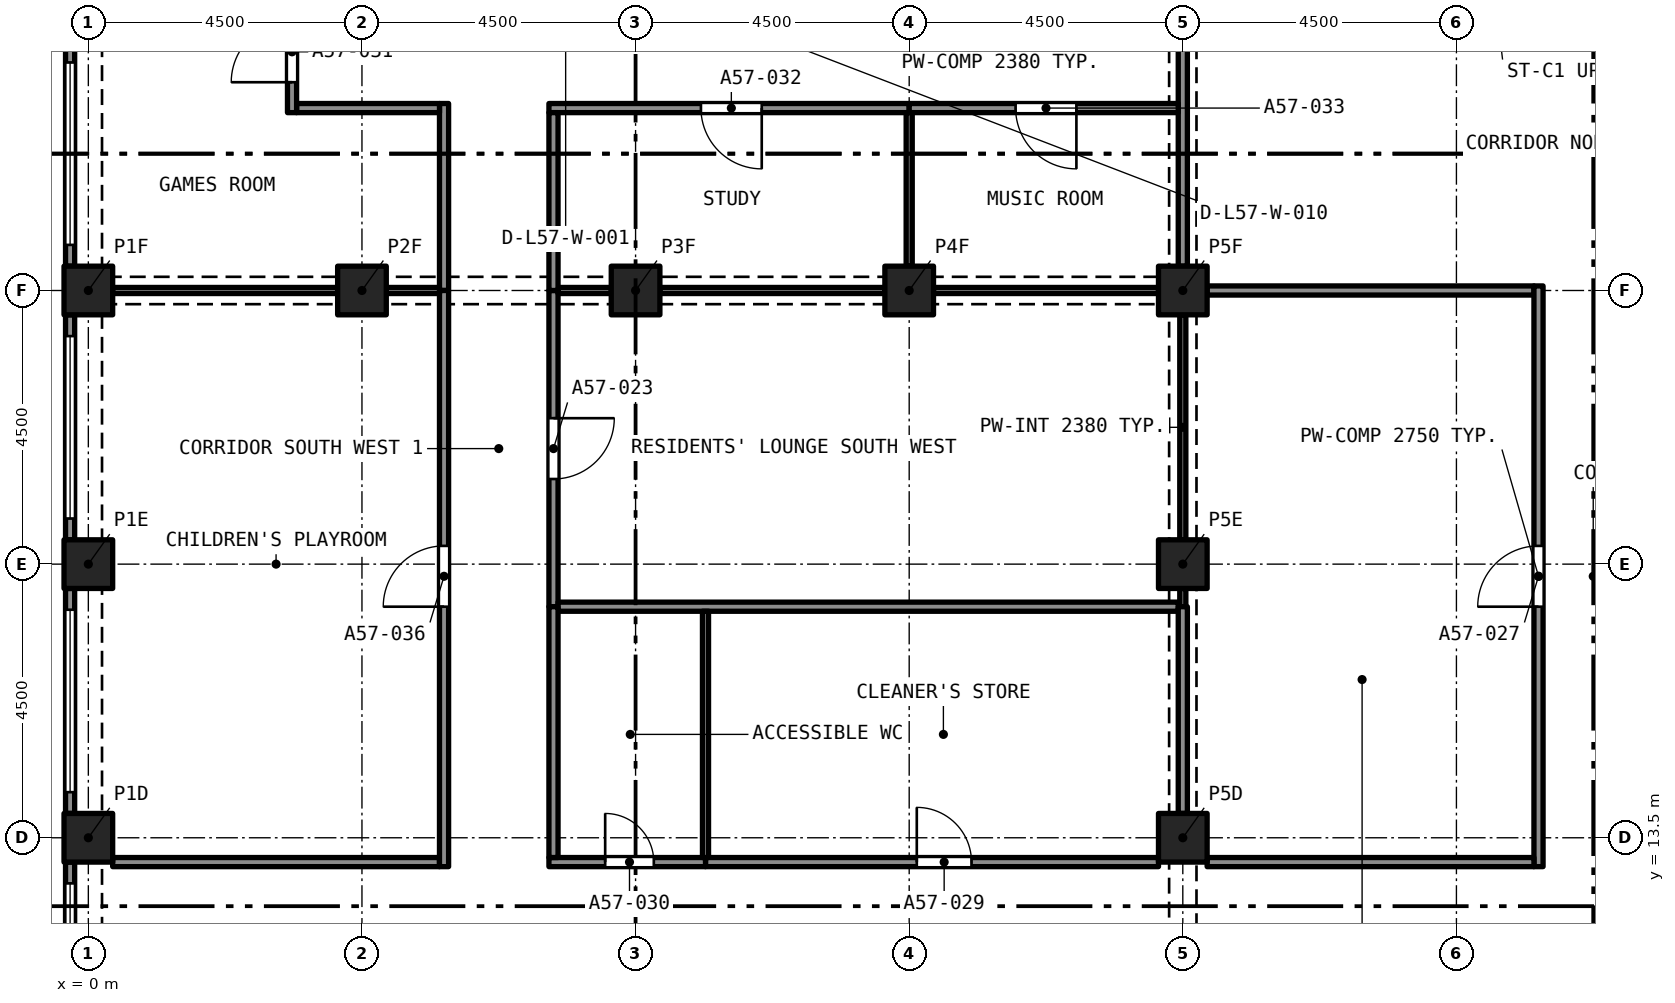
"""IFC4 building model, lengths in metres.
Left out: names, types, materials, properties, quantities, classifications, styles, units other than length and angle.
Written with IfcOpenShell. Run it as: python <this file> out.ifc"""

import sys

from ifc_helpers import new_model, si_unit, direction, frame, frame_2d, origin, origin_2d, place, context, subcontext, project, spatial, rectangle, extrude, element, fill, save


model = new_model("IFC4")
c1 = context("Model", 3, precision=1e-05, world=origin(), true_north=direction((0.0, 1.0)))
c2 = subcontext(c1, "Body", "Model", "MODEL_VIEW")
j1 = project(units=[si_unit("LENGTHUNIT", "METRE"), si_unit("PLANEANGLEUNIT", "RADIAN")], contexts=[c1])
p1 = place(None, origin())
s1 = spatial("IfcSite", under=j1, at=p1, CompositionType="ELEMENT")
p2 = place(p1, origin())
s2 = spatial("IfcBuilding", under=s1, at=p2, CompositionType="ELEMENT")
p3 = place(p2, frame((0.0, 0.0, 206.895)))
s3 = spatial("IfcBuildingStorey", under=s2, at=p3, CompositionType="ELEMENT", Elevation=206.895)
for number, where, z_axis, x_axis in (
    (1, (0.0, 13.5, 0.0), (0.0, 0.0, 1.0), (1.0, 0.0, 0.0)),
    (2, (18.0, 13.5, 0.0), (0.0, 0.0, 1.0), (1.0, 0.0, 0.0)),
    (3, (0.0, 18.0, 0.0), (0.0, 0.0, 1.0), (1.0, 0.0, 0.0)),
    (4, (18.0, 18.0, 0.0), (0.0, 0.0, 1.0), (1.0, 0.0, 0.0)),
    (5, (0.0, 22.5, 0.0), (0.0, 0.0, 1.0), (1.0, 0.0, 0.0)),
    (6, (4.5, 22.5, 0.0), (0.0, 0.0, 1.0), (1.0, 0.0, 0.0)),
    (7, (9.0, 22.5, 0.0), (0.0, 0.0, 1.0), (1.0, 0.0, 0.0)),
    (8, (13.5, 22.5, 0.0), (0.0, 0.0, 1.0), (1.0, 0.0, 0.0)),
    (9, (18.0, 22.5, 0.0), (0.0, 0.0, 1.0), (1.0, 0.0, 0.0)),
):
    element("IfcColumn", number, at=place(p3, frame(where, z_axis=z_axis, x_axis=x_axis)), inside=s3, PredefinedType="COLUMN", context=c2, shape_type="SweptSolid", body=[
        extrude(rectangle(XDim=0.8, YDim=0.8, at=origin_2d()), origin(), (0.0, 0.0, 1.0), 3.2),
    ])
p4 = place(p3, frame((-0.3, 22.9, 0.0), z_axis=(0.0, 0.0, 1.0), x_axis=(0.0, 1.0, 0.0)))
e10 = element("IfcWall", 10, at=p4, inside=s3, PredefinedType="SOLIDWALL", context=c2, shape_type="SweptSolid", body=[
    extrude(rectangle(XDim=3.7, YDim=0.15, at=frame_2d((1.85, 0.0))), origin(), (0.0, 0.0, 1.0), 3.2),
])
p5 = place(p4, frame((0.35, 0.0, 0.45)))
e11 = element("IfcOpeningElement", 11, at=p5, cuts=e10, PredefinedType="OPENING", context=c2, shape_type="SweptSolid", body=[
    extrude(rectangle(XDim=3.0, YDim=1.95, at=frame_2d((1.5, 0.975))), frame((0.0, 0.085, 0.0), z_axis=(0.0, -1.0, 0.0), x_axis=(1.0, 0.0, 0.0)), (0.0, 0.0, 1.0), 0.17),
])
p6 = place(p3, frame((-0.3, 18.4, 0.0), z_axis=(0.0, 0.0, 1.0), x_axis=(0.0, 1.0, 0.0)))
e12 = element("IfcWall", 12, at=p6, inside=s3, PredefinedType="SOLIDWALL", context=c2, shape_type="SweptSolid", body=[
    extrude(rectangle(XDim=3.7, YDim=0.15, at=frame_2d((1.85, 0.0))), origin(), (0.0, 0.0, 1.0), 3.2),
])
p7 = place(p6, frame((0.35, 0.0, 0.45)))
e13 = element("IfcOpeningElement", 13, at=p7, cuts=e12, PredefinedType="OPENING", context=c2, shape_type="SweptSolid", body=[
    extrude(rectangle(XDim=3.0, YDim=1.95, at=frame_2d((1.5, 0.975))), frame((0.0, 0.085, 0.0), z_axis=(0.0, -1.0, 0.0), x_axis=(1.0, 0.0, 0.0)), (0.0, 0.0, 1.0), 0.17),
])
p8 = place(p3, frame((-0.3, 13.9, 0.0), z_axis=(0.0, 0.0, 1.0), x_axis=(0.0, 1.0, 0.0)))
e14 = element("IfcWall", 14, at=p8, inside=s3, PredefinedType="SOLIDWALL", context=c2, shape_type="SweptSolid", body=[
    extrude(rectangle(XDim=3.7, YDim=0.15, at=frame_2d((1.85, 0.0))), origin(), (0.0, 0.0, 1.0), 3.2),
])
p9 = place(p8, frame((0.35, 0.0, 0.45)))
e15 = element("IfcOpeningElement", 15, at=p9, cuts=e14, PredefinedType="OPENING", context=c2, shape_type="SweptSolid", body=[
    extrude(rectangle(XDim=3.0, YDim=1.95, at=frame_2d((1.5, 0.975))), frame((0.0, 0.085, 0.0), z_axis=(0.0, -1.0, 0.0), x_axis=(1.0, 0.0, 0.0)), (0.0, 0.0, 1.0), 0.17),
])
p10 = place(p3, frame((-0.3, 9.4, 0.0), z_axis=(0.0, 0.0, 1.0), x_axis=(0.0, 1.0, 0.0)))
e16 = element("IfcWall", 16, at=p10, inside=s3, PredefinedType="SOLIDWALL", context=c2, shape_type="SweptSolid", body=[
    extrude(rectangle(XDim=3.7, YDim=0.15, at=frame_2d((1.85, 0.0))), origin(), (0.0, 0.0, 1.0), 3.2),
])
p11 = place(p10, frame((0.35, 0.0, 0.45)))
e17 = element("IfcOpeningElement", 17, at=p11, cuts=e16, PredefinedType="OPENING", context=c2, shape_type="SweptSolid", body=[
    extrude(rectangle(XDim=3.0, YDim=1.95, at=frame_2d((1.5, 0.975))), frame((0.0, 0.085, 0.0), z_axis=(0.0, -1.0, 0.0), x_axis=(1.0, 0.0, 0.0)), (0.0, 0.0, 1.0), 0.17),
])
p12 = place(p3, frame((18.0, 18.4, 0.0), z_axis=(0.0, 0.0, 1.0), x_axis=(0.0, 1.0, 0.0)))
e18 = element("IfcWall", 18, at=p12, inside=s3, PredefinedType="PARTITIONING", context=c2, shape_type="SweptSolid", body=[
    extrude(rectangle(XDim=3.7, YDim=0.1, at=frame_2d((1.85, 0.0))), origin(), (0.0, 0.0, 1.0), 2.38),
])
p13 = place(p3, frame((18.0, 17.3, 0.0), z_axis=(0.0, 0.0, 1.0), x_axis=(0.0, 1.0, 0.0)))
e19 = element("IfcWall", 19, at=p13, inside=s3, PredefinedType="PARTITIONING", context=c2, shape_type="SweptSolid", body=[
    extrude(rectangle(XDim=0.3, YDim=0.1, at=frame_2d((0.15, 0.0))), origin(), (0.0, 0.0, 1.0), 2.75),
])
p14 = place(p3, frame((7.65, 22.5, 0.0), z_axis=(0.0, 0.0, 1.0), x_axis=(0.0, -1.0, 0.0)))
e20 = element("IfcWall", 20, at=p14, inside=s3, PredefinedType="PARTITIONING", context=c2, shape_type="SweptSolid", body=[
    extrude(rectangle(XDim=5.2, YDim=0.15, at=frame_2d((2.6, 0.0))), origin(), (0.0, 0.0, 1.0), 2.9),
])
p15 = place(p14, frame((2.1, 0.0, 0.0)))
e21 = element("IfcOpeningElement", 21, at=p15, cuts=e20, PredefinedType="OPENING", context=c2, shape_type="SweptSolid", body=[
    extrude(rectangle(XDim=1.0, YDim=2.1, at=frame_2d((0.5, 1.05))), frame((0.0, 0.085, 0.0), z_axis=(0.0, -1.0, 0.0), x_axis=(1.0, 0.0, 0.0)), (0.0, 0.0, 1.0), 0.17),
])
p16 = place(p3, frame((7.725, 22.5, 0.0), z_axis=(0.0, 0.0, 1.0), x_axis=(1.0, 0.0, 0.0)))
e22 = element("IfcWall", 22, at=p16, inside=s3, PredefinedType="PARTITIONING", context=c2, shape_type="SweptSolid", body=[
    extrude(rectangle(XDim=0.875, YDim=0.1, at=frame_2d((0.438, 0.0))), origin(), (0.0, 0.0, 1.0), 2.38),
])
for number, where, z_axis, x_axis in (
    (23, (9.4, 22.5, 0.0), (0.0, 0.0, 1.0), (1.0, 0.0, 0.0)),
    (24, (13.9, 22.5, 0.0), (0.0, 0.0, 1.0), (1.0, 0.0, 0.0)),
):
    element("IfcWall", number, at=place(p3, frame(where, z_axis=z_axis, x_axis=x_axis)), inside=s3, PredefinedType="PARTITIONING", context=c2, shape_type="SweptSolid", body=[
        extrude(rectangle(XDim=3.7, YDim=0.1, at=frame_2d((1.85, 0.0))), origin(), (0.0, 0.0, 1.0), 2.38),
    ])
p17 = place(p3, frame((7.725, 17.3, 0.0), z_axis=(0.0, 0.0, 1.0), x_axis=(1.0, 0.0, 0.0)))
e25 = element("IfcWall", 25, at=p17, inside=s3, PredefinedType="PARTITIONING", context=c2, shape_type="SweptSolid", body=[
    extrude(rectangle(XDim=10.2, YDim=0.15, at=frame_2d((5.1, 0.0))), origin(), (0.0, 0.0, 1.0), 2.9),
])
p18 = place(p3, frame((18.4, 22.5, 0.0), z_axis=(0.0, 0.0, 1.0), x_axis=(1.0, 0.0, 0.0)))
e26 = element("IfcWall", 26, at=p18, inside=s3, PredefinedType="PARTITIONING", context=c2, shape_type="SweptSolid", body=[
    extrude(rectangle(XDim=5.375, YDim=0.15, at=frame_2d((2.688, 0.0))), origin(), (0.0, 0.0, 1.0), 2.75),
])
p19 = place(p3, frame((18.0, 22.9, 0.0), z_axis=(0.0, 0.0, 1.0), x_axis=(0.0, 1.0, 0.0)))
e27 = element("IfcWall", 27, at=p19, inside=s3, PredefinedType="PARTITIONING", context=c2, shape_type="SweptSolid", body=[
    extrude(rectangle(XDim=3.7, YDim=0.15, at=frame_2d((1.85, 0.0))), origin(), (0.0, 0.0, 1.0), 2.38),
])
p20 = place(p3, frame((23.85, 13.025, 0.0), z_axis=(0.0, 0.0, 1.0), x_axis=(0.0, 1.0, 0.0)))
e28 = element("IfcWall", 28, at=p20, inside=s3, PredefinedType="PARTITIONING", context=c2, shape_type="SweptSolid", body=[
    extrude(rectangle(XDim=9.55, YDim=0.15, at=frame_2d((4.775, 0.0))), origin(), (0.0, 0.0, 1.0), 2.75),
])
p21 = place(p20, frame((4.275, 0.0, 0.0)))
e29 = element("IfcOpeningElement", 29, at=p21, cuts=e28, PredefinedType="OPENING", context=c2, shape_type="SweptSolid", body=[
    extrude(rectangle(XDim=1.0, YDim=2.1, at=frame_2d((0.5, 1.05))), frame((0.0, 0.085, 0.0), z_axis=(0.0, -1.0, 0.0), x_axis=(1.0, 0.0, 0.0)), (0.0, 0.0, 1.0), 0.17),
])
p22 = place(p3, frame((18.4, 13.1, 0.0), z_axis=(0.0, 0.0, 1.0), x_axis=(1.0, 0.0, 0.0)))
e30 = element("IfcWall", 30, at=p22, inside=s3, PredefinedType="PARTITIONING", context=c2, shape_type="SweptSolid", body=[
    extrude(rectangle(XDim=5.375, YDim=0.15, at=frame_2d((2.688, 0.0))), origin(), (0.0, 0.0, 1.0), 2.75),
])
p23 = place(p3, frame((10.15, 13.1, 0.0), z_axis=(0.0, 0.0, 1.0), x_axis=(1.0, 0.0, 0.0)))
e31 = element("IfcWall", 31, at=p23, inside=s3, PredefinedType="PARTITIONING", context=c2, shape_type="SweptSolid", body=[
    extrude(rectangle(XDim=7.45, YDim=0.15, at=frame_2d((3.725, 0.0))), origin(), (0.0, 0.0, 1.0), 2.9),
])
p24 = place(p23, frame((3.475, 0.0, 0.0)))
e32 = element("IfcOpeningElement", 32, at=p24, cuts=e31, PredefinedType="OPENING", context=c2, shape_type="SweptSolid", body=[
    extrude(rectangle(XDim=0.9, YDim=2.1, at=frame_2d((0.45, 1.05))), frame((0.0, 0.085, 0.0), z_axis=(0.0, -1.0, 0.0), x_axis=(1.0, 0.0, 0.0)), (0.0, 0.0, 1.0), 0.17),
])
p25 = place(p3, frame((7.575, 13.1, 0.0), z_axis=(0.0, 0.0, 1.0), x_axis=(1.0, 0.0, 0.0)))
e33 = element("IfcWall", 33, at=p25, inside=s3, PredefinedType="PARTITIONING", context=c2, shape_type="SweptSolid", body=[
    extrude(rectangle(XDim=2.575, YDim=0.15, at=frame_2d((1.288, 0.0))), origin(), (0.0, 0.0, 1.0), 2.9),
])
p26 = place(p25, frame((0.925, 0.0, 0.0)))
e34 = element("IfcOpeningElement", 34, at=p26, cuts=e33, PredefinedType="OPENING", context=c2, shape_type="SweptSolid", body=[
    extrude(rectangle(XDim=0.8, YDim=2.1, at=frame_2d((0.4, 1.05))), frame((0.0, 0.085, 0.0), z_axis=(0.0, -1.0, 0.0), x_axis=(1.0, 0.0, 0.0)), (0.0, 0.0, 1.0), 0.17),
])
p27 = place(p3, frame((0.4, 13.1, 0.0), z_axis=(0.0, 0.0, 1.0), x_axis=(1.0, 0.0, 0.0)))
e35 = element("IfcWall", 35, at=p27, inside=s3, PredefinedType="PARTITIONING", context=c2, shape_type="SweptSolid", body=[
    extrude(rectangle(XDim=5.375, YDim=0.15, at=frame_2d((2.688, 0.0))), origin(), (0.0, 0.0, 1.0), 2.9),
])
p28 = place(p3, frame((18.0, 13.9, 0.0), z_axis=(0.0, 0.0, 1.0), x_axis=(0.0, 1.0, 0.0)))
e36 = element("IfcWall", 36, at=p28, inside=s3, PredefinedType="PARTITIONING", context=c2, shape_type="SweptSolid", body=[
    extrude(rectangle(XDim=3.4, YDim=0.15, at=frame_2d((1.7, 0.0))), origin(), (0.0, 0.0, 1.0), 2.38),
])
p29 = place(p3, frame((5.85, 22.5, 0.0), z_axis=(0.0, 0.0, 1.0), x_axis=(0.0, 1.0, 0.0)))
e37 = element("IfcWall", 37, at=p29, inside=s3, PredefinedType="PARTITIONING", context=c2, shape_type="SweptSolid", body=[
    extrude(rectangle(XDim=3.075, YDim=0.15, at=frame_2d((1.538, 0.0))), origin(), (0.0, 0.0, 1.0), 2.9),
])
p30 = place(p3, frame((3.425, 25.5, 0.0), z_axis=(0.0, 0.0, 1.0), x_axis=(1.0, 0.0, 0.0)))
e38 = element("IfcWall", 38, at=p30, inside=s3, PredefinedType="PARTITIONING", context=c2, shape_type="SweptSolid", body=[
    extrude(rectangle(XDim=2.35, YDim=0.15, at=frame_2d((1.175, 0.0))), origin(), (0.0, 0.0, 1.0), 2.9),
])
p31 = place(p3, frame((3.35, 25.425, 0.0), z_axis=(0.0, 0.0, 1.0), x_axis=(0.0, 1.0, 0.0)))
e39 = element("IfcWall", 39, at=p31, inside=s3, PredefinedType="PARTITIONING", context=c2, shape_type="SweptSolid", body=[
    extrude(rectangle(XDim=1.925, YDim=0.15, at=frame_2d((0.962, 0.0))), origin(), (0.0, 0.0, 1.0), 2.9),
])
p32 = place(p31, frame((0.5, 0.0, 0.0)))
e40 = element("IfcOpeningElement", 40, at=p32, cuts=e39, PredefinedType="OPENING", context=c2, shape_type="SweptSolid", body=[
    extrude(rectangle(XDim=1.0, YDim=2.1, at=frame_2d((0.5, 1.05))), frame((0.0, 0.085, 0.0), z_axis=(0.0, -1.0, 0.0), x_axis=(1.0, 0.0, 0.0)), (0.0, 0.0, 1.0), 0.17),
])
p33 = place(p3, frame((13.5, 25.5, 0.0), z_axis=(0.0, 0.0, 1.0), x_axis=(-1.0, 0.0, 0.0)))
e41 = element("IfcWall", 41, at=p33, inside=s3, PredefinedType="PARTITIONING", context=c2, shape_type="SweptSolid", body=[
    extrude(rectangle(XDim=5.925, YDim=0.15, at=frame_2d((2.962, 0.0))), origin(), (0.0, 0.0, 1.0), 2.9),
])
p34 = place(p33, frame((2.425, 0.0, 0.0)))
e42 = element("IfcOpeningElement", 42, at=p34, cuts=e41, PredefinedType="OPENING", context=c2, shape_type="SweptSolid", body=[
    extrude(rectangle(XDim=1.0, YDim=2.1, at=frame_2d((0.5, 1.05))), frame((0.0, 0.085, 0.0), z_axis=(0.0, -1.0, 0.0), x_axis=(1.0, 0.0, 0.0)), (0.0, 0.0, 1.0), 0.17),
])
p35 = place(p3, frame((7.65, 22.5, 0.0), z_axis=(0.0, 0.0, 1.0), x_axis=(0.0, 1.0, 0.0)))
e43 = element("IfcWall", 43, at=p35, inside=s3, PredefinedType="PARTITIONING", context=c2, shape_type="SweptSolid", body=[
    extrude(rectangle(XDim=2.925, YDim=0.15, at=frame_2d((1.462, 0.0))), origin(), (0.0, 0.0, 1.0), 2.9),
])
p36 = place(p3, frame((17.925, 25.5, 0.0), z_axis=(0.0, 0.0, 1.0), x_axis=(-1.0, 0.0, 0.0)))
e44 = element("IfcWall", 44, at=p36, inside=s3, PredefinedType="PARTITIONING", context=c2, shape_type="SweptSolid", body=[
    extrude(rectangle(XDim=4.425, YDim=0.15, at=frame_2d((2.212, 0.0))), origin(), (0.0, 0.0, 1.0), 2.9),
])
p37 = place(p36, frame((1.675, 0.0, 0.0)))
e45 = element("IfcOpeningElement", 45, at=p37, cuts=e44, PredefinedType="OPENING", context=c2, shape_type="SweptSolid", body=[
    extrude(rectangle(XDim=1.0, YDim=2.1, at=frame_2d((0.5, 1.05))), frame((0.0, 0.085, 0.0), z_axis=(0.0, -1.0, 0.0), x_axis=(1.0, 0.0, 0.0)), (0.0, 0.0, 1.0), 0.17),
])
p38 = place(p3, frame((7.65, 13.175, 0.0), z_axis=(0.0, 0.0, 1.0), x_axis=(0.0, 1.0, 0.0)))
e46 = element("IfcWall", 46, at=p38, inside=s3, PredefinedType="PARTITIONING", context=c2, shape_type="SweptSolid", body=[
    extrude(rectangle(XDim=4.125, YDim=0.15, at=frame_2d((2.062, 0.0))), origin(), (0.0, 0.0, 1.0), 2.9),
])
p39 = place(p3, frame((5.85, 13.025, 0.0), z_axis=(0.0, 0.0, 1.0), x_axis=(0.0, 1.0, 0.0)))
e47 = element("IfcWall", 47, at=p39, inside=s3, PredefinedType="PARTITIONING", context=c2, shape_type="SweptSolid", body=[
    extrude(rectangle(XDim=9.475, YDim=0.15, at=frame_2d((4.738, 0.0))), origin(), (0.0, 0.0, 1.0), 2.9),
])
p40 = place(p39, frame((4.275, 0.0, 0.0)))
e48 = element("IfcOpeningElement", 48, at=p40, cuts=e47, PredefinedType="OPENING", context=c2, shape_type="SweptSolid", body=[
    extrude(rectangle(XDim=1.0, YDim=2.1, at=frame_2d((0.5, 1.05))), frame((0.0, 0.085, 0.0), z_axis=(0.0, -1.0, 0.0), x_axis=(1.0, 0.0, 0.0)), (0.0, 0.0, 1.0), 0.17),
])
p41 = place(p3, frame((4.9, 22.5, 0.0), z_axis=(0.0, 0.0, 1.0), x_axis=(1.0, 0.0, 0.0)))
e49 = element("IfcWall", 49, at=p41, inside=s3, PredefinedType="PARTITIONING", context=c2, shape_type="SweptSolid", body=[
    extrude(rectangle(XDim=0.875, YDim=0.1, at=frame_2d((0.438, 0.0))), origin(), (0.0, 0.0, 1.0), 2.38),
])
p42 = place(p3, frame((0.4, 22.5, 0.0), z_axis=(0.0, 0.0, 1.0), x_axis=(1.0, 0.0, 0.0)))
e50 = element("IfcWall", 50, at=p42, inside=s3, PredefinedType="PARTITIONING", context=c2, shape_type="SweptSolid", body=[
    extrude(rectangle(XDim=3.7, YDim=0.1, at=frame_2d((1.85, 0.0))), origin(), (0.0, 0.0, 1.0), 2.38),
])
p43 = place(p3, frame((13.5, 22.9, 0.0), z_axis=(0.0, 0.0, 1.0), x_axis=(0.0, 1.0, 0.0)))
e51 = element("IfcWall", 51, at=p43, inside=s3, PredefinedType="PARTITIONING", context=c2, shape_type="SweptSolid", body=[
    extrude(rectangle(XDim=2.525, YDim=0.1, at=frame_2d((1.263, 0.0))), origin(), (0.0, 0.0, 1.0), 2.9),
])
p44 = place(p3, frame((10.15, 13.175, 0.0), z_axis=(0.0, 0.0, 1.0), x_axis=(0.0, 1.0, 0.0)))
e52 = element("IfcWall", 52, at=p44, inside=s3, PredefinedType="PARTITIONING", context=c2, shape_type="SweptSolid", body=[
    extrude(rectangle(XDim=4.05, YDim=0.1, at=frame_2d((2.025, 0.0))), origin(), (0.0, 0.0, 1.0), 2.9),
])
p45 = place(p5, origin())
e53 = element("IfcWindow", 53, at=p45, inside=s3, PartitioningType="SINGLE_PANEL", PredefinedType="WINDOW", context=c2, shape_type="SweptSolid", body=[
    extrude(rectangle(XDim=3.0, YDim=1.95, at=frame_2d((1.5, 0.975))), frame((0.0, 0.03, 0.0), z_axis=(0.0, -1.0, 0.0), x_axis=(1.0, 0.0, 0.0)), (0.0, 0.0, 1.0), 0.06),
])
fill(e11, e53)
p46 = place(p7, origin())
e54 = element("IfcWindow", 54, at=p46, inside=s3, PartitioningType="SINGLE_PANEL", PredefinedType="WINDOW", context=c2, shape_type="SweptSolid", body=[
    extrude(rectangle(XDim=3.0, YDim=1.95, at=frame_2d((1.5, 0.975))), frame((0.0, 0.03, 0.0), z_axis=(0.0, -1.0, 0.0), x_axis=(1.0, 0.0, 0.0)), (0.0, 0.0, 1.0), 0.06),
])
fill(e13, e54)
p47 = place(p9, origin())
e55 = element("IfcWindow", 55, at=p47, inside=s3, PartitioningType="SINGLE_PANEL", PredefinedType="WINDOW", context=c2, shape_type="SweptSolid", body=[
    extrude(rectangle(XDim=3.0, YDim=1.95, at=frame_2d((1.5, 0.975))), frame((0.0, 0.03, 0.0), z_axis=(0.0, -1.0, 0.0), x_axis=(1.0, 0.0, 0.0)), (0.0, 0.0, 1.0), 0.06),
])
fill(e15, e55)
p48 = place(p11, origin())
e56 = element("IfcWindow", 56, at=p48, inside=s3, PartitioningType="SINGLE_PANEL", PredefinedType="WINDOW", context=c2, shape_type="SweptSolid", body=[
    extrude(rectangle(XDim=3.0, YDim=1.95, at=frame_2d((1.5, 0.975))), frame((0.0, 0.03, 0.0), z_axis=(0.0, -1.0, 0.0), x_axis=(1.0, 0.0, 0.0)), (0.0, 0.0, 1.0), 0.06),
])
fill(e17, e56)
p49 = place(p15, origin())
e57 = element("IfcDoor", 57, at=p49, inside=s3, OperationType="SINGLE_SWING_RIGHT", PredefinedType="DOOR", context=c2, shape_type="SweptSolid", body=[
    extrude(rectangle(XDim=1.0, YDim=2.1, at=frame_2d((0.5, 1.05))), frame((0.0, 0.025, 0.0), z_axis=(0.0, -1.0, 0.0), x_axis=(1.0, 0.0, 0.0)), (0.0, 0.0, 1.0), 0.05),
])
fill(e21, e57)
p50 = place(p21, origin())
e58 = element("IfcDoor", 58, at=p50, inside=s3, OperationType="SINGLE_SWING_RIGHT", PredefinedType="DOOR", context=c2, shape_type="SweptSolid", body=[
    extrude(rectangle(XDim=1.0, YDim=2.1, at=frame_2d((0.5, 1.05))), frame((0.0, 0.025, 0.0), z_axis=(0.0, -1.0, 0.0), x_axis=(1.0, 0.0, 0.0)), (0.0, 0.0, 1.0), 0.05),
])
fill(e29, e58)
p51 = place(p24, origin())
e59 = element("IfcDoor", 59, at=p51, inside=s3, OperationType="SINGLE_SWING_RIGHT", PredefinedType="DOOR", context=c2, shape_type="SweptSolid", body=[
    extrude(rectangle(XDim=0.9, YDim=2.1, at=frame_2d((0.45, 1.05))), frame((0.0, 0.025, 0.0), z_axis=(0.0, -1.0, 0.0), x_axis=(1.0, 0.0, 0.0)), (0.0, 0.0, 1.0), 0.05),
])
fill(e32, e59)
p52 = place(p26, origin())
e60 = element("IfcDoor", 60, at=p52, inside=s3, OperationType="SINGLE_SWING_RIGHT", PredefinedType="DOOR", context=c2, shape_type="SweptSolid", body=[
    extrude(rectangle(XDim=0.8, YDim=2.1, at=frame_2d((0.4, 1.05))), frame((0.0, 0.025, 0.0), z_axis=(0.0, -1.0, 0.0), x_axis=(1.0, 0.0, 0.0)), (0.0, 0.0, 1.0), 0.05),
])
fill(e34, e60)
p53 = place(p32, origin())
e61 = element("IfcDoor", 61, at=p53, inside=s3, OperationType="SINGLE_SWING_RIGHT", PredefinedType="DOOR", context=c2, shape_type="SweptSolid", body=[
    extrude(rectangle(XDim=1.0, YDim=2.1, at=frame_2d((0.5, 1.05))), frame((0.0, 0.025, 0.0), z_axis=(0.0, -1.0, 0.0), x_axis=(1.0, 0.0, 0.0)), (0.0, 0.0, 1.0), 0.05),
])
fill(e40, e61)
p54 = place(p34, origin())
e62 = element("IfcDoor", 62, at=p54, inside=s3, OperationType="SINGLE_SWING_LEFT", PredefinedType="DOOR", context=c2, shape_type="SweptSolid", body=[
    extrude(rectangle(XDim=1.0, YDim=2.1, at=frame_2d((0.5, 1.05))), frame((0.0, 0.025, 0.0), z_axis=(0.0, -1.0, 0.0), x_axis=(1.0, 0.0, 0.0)), (0.0, 0.0, 1.0), 0.05),
])
fill(e42, e62)
p55 = place(p37, origin())
e63 = element("IfcDoor", 63, at=p55, inside=s3, OperationType="SINGLE_SWING_LEFT", PredefinedType="DOOR", context=c2, shape_type="SweptSolid", body=[
    extrude(rectangle(XDim=1.0, YDim=2.1, at=frame_2d((0.5, 1.05))), frame((0.0, 0.025, 0.0), z_axis=(0.0, -1.0, 0.0), x_axis=(1.0, 0.0, 0.0)), (0.0, 0.0, 1.0), 0.05),
])
fill(e45, e63)
p56 = place(p40, origin())
e64 = element("IfcDoor", 64, at=p56, inside=s3, OperationType="SINGLE_SWING_RIGHT", PredefinedType="DOOR", context=c2, shape_type="SweptSolid", body=[
    extrude(rectangle(XDim=1.0, YDim=2.1, at=frame_2d((0.5, 1.05))), frame((0.0, 0.025, 0.0), z_axis=(0.0, -1.0, 0.0), x_axis=(1.0, 0.0, 0.0)), (0.0, 0.0, 1.0), 0.05),
])
fill(e48, e64)
save(model, sys.argv[1])
